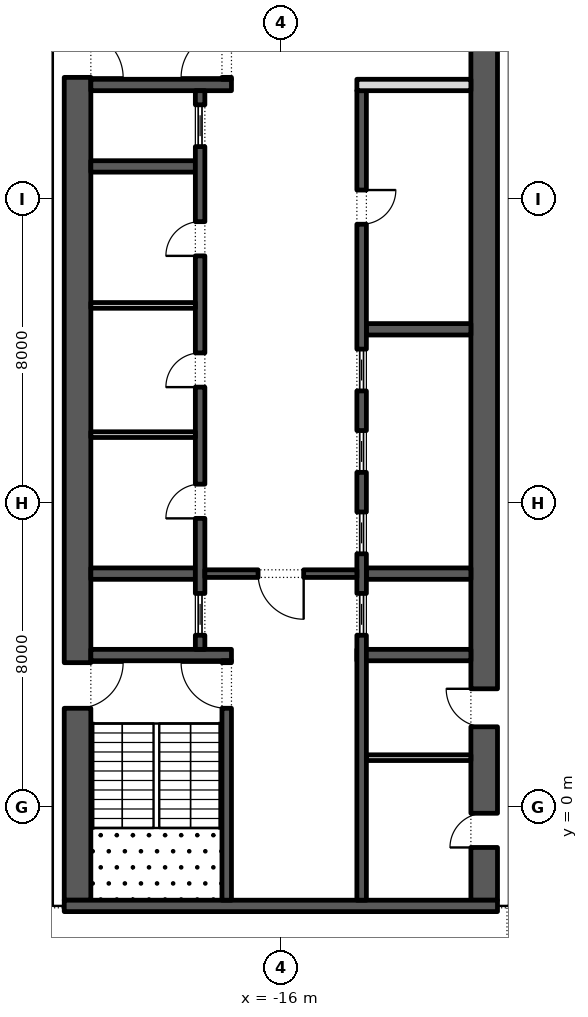
"""IFC4 building model, lengths in metres.
Left out: names, types, materials, properties, quantities, classifications, styles, units other than length and angle.
Written with IfcOpenShell. Run it as: python <this file> out.ifc"""

import sys

from ifc_helpers import new_model, si_unit, direction, frame, frame_2d, origin, place, context, subcontext, project, spatial, rectangle, extrude, element, fill, save


model = new_model("IFC4")
c1 = context("Model", 3, precision=1e-05, world=origin(), true_north=direction((0.0, 1.0)))
c2 = subcontext(c1, "Body", "Model", "MODEL_VIEW")
j1 = project(units=[si_unit("LENGTHUNIT", "METRE"), si_unit("PLANEANGLEUNIT", "RADIAN")], contexts=[c1])
p1 = place(None, origin())
s1 = spatial("IfcSite", under=j1, at=p1, CompositionType="ELEMENT")
p2 = place(p1, origin())
s2 = spatial("IfcBuilding", under=s1, at=p2, CompositionType="ELEMENT")
p3 = place(p2, frame((0.0, 0.0, 222.0)))
s3 = spatial("IfcBuildingStorey", under=s2, at=p3, CompositionType="ELEMENT", Elevation=222.0)
p4 = place(p3, frame((-33.157, 30.092, 0.0), z_axis=(0.0, 0.0, 1.0), x_axis=(0.224950279389, -0.974370243697, 0.0)))
e1 = element("IfcWall", 1, at=p4, inside=s3, PredefinedType="STANDARD", context=c2, shape_type="SweptSolid", body=[
    extrude(rectangle(XDim=49.5, YDim=0.3, at=frame_2d((24.75, 0.0))), origin(), (0.0, 0.0, 1.0), 3.75),
])
p5 = place(p4, frame((2.207, 0.0, 0.0)))
e2 = element("IfcOpeningElement", 2, at=p5, cuts=e1, PredefinedType="OPENING", context=c2, shape_type="SweptSolid", body=[
    extrude(rectangle(XDim=2.4, YDim=3.5, at=frame_2d((1.2, 1.75))), frame((0.0, 0.16, 0.0), z_axis=(0.0, -1.0, 0.0), x_axis=(1.0, 0.0, 0.0)), (0.0, 0.0, 1.0), 0.32),
])
p6 = place(p4, frame((7.871, 0.0, 0.45)))
e3 = element("IfcOpeningElement", 3, at=p6, cuts=e1, PredefinedType="OPENING", context=c2, shape_type="SweptSolid", body=[
    extrude(rectangle(XDim=5.0, YDim=2.575, at=frame_2d((2.5, 1.288))), frame((0.0, 0.16, 0.0), z_axis=(0.0, -1.0, 0.0), x_axis=(1.0, 0.0, 0.0)), (0.0, 0.0, 1.0), 0.32),
])
p7 = place(p4, frame((14.986, 0.0, 0.45)))
e4 = element("IfcOpeningElement", 4, at=p7, cuts=e1, PredefinedType="OPENING", context=c2, shape_type="SweptSolid", body=[
    extrude(rectangle(XDim=5.0, YDim=3.25, at=frame_2d((2.5, 1.625))), frame((0.0, 0.16, 0.0), z_axis=(0.0, -1.0, 0.0), x_axis=(1.0, 0.0, 0.0)), (0.0, 0.0, 1.0), 0.32),
])
p8 = place(p4, frame((22.1, 0.0, 0.45)))
e5 = element("IfcOpeningElement", 5, at=p8, cuts=e1, PredefinedType="OPENING", context=c2, shape_type="SweptSolid", body=[
    extrude(rectangle(XDim=5.0, YDim=2.75, at=frame_2d((2.5, 1.375))), frame((0.0, 0.16, 0.0), z_axis=(0.0, -1.0, 0.0), x_axis=(1.0, 0.0, 0.0)), (0.0, 0.0, 1.0), 0.32),
])
p9 = place(p4, frame((30.514, 0.0, 0.0)))
e6 = element("IfcOpeningElement", 6, at=p9, cuts=e1, PredefinedType="OPENING", context=c2, shape_type="SweptSolid", body=[
    extrude(rectangle(XDim=2.4, YDim=3.5, at=frame_2d((1.2, 1.75))), frame((0.0, 0.16, 0.0), z_axis=(0.0, -1.0, 0.0), x_axis=(1.0, 0.0, 0.0)), (0.0, 0.0, 1.0), 0.32),
])
p10 = place(p4, frame((36.329, 0.0, 0.45)))
e7 = element("IfcOpeningElement", 7, at=p10, cuts=e1, PredefinedType="OPENING", context=c2, shape_type="SweptSolid", body=[
    extrude(rectangle(XDim=5.0, YDim=3.25, at=frame_2d((2.5, 1.625))), frame((0.0, 0.16, 0.0), z_axis=(0.0, -1.0, 0.0), x_axis=(1.0, 0.0, 0.0)), (0.0, 0.0, 1.0), 0.32),
])
p11 = place(p4, frame((43.443, 0.0, 0.45)))
e8 = element("IfcOpeningElement", 8, at=p11, cuts=e1, PredefinedType="OPENING", context=c2, shape_type="SweptSolid", body=[
    extrude(rectangle(XDim=5.0, YDim=3.25, at=frame_2d((2.5, 1.625))), frame((0.0, 0.16, 0.0), z_axis=(0.0, -1.0, 0.0), x_axis=(1.0, 0.0, 0.0)), (0.0, 0.0, 1.0), 0.32),
])
p12 = place(p3, frame((-21.35, -2.45, 0.0), z_axis=(0.0, 0.0, 1.0), x_axis=(0.0, 1.0, 0.0)))
e9 = element("IfcWall", 9, at=p12, inside=s3, PredefinedType="SHEAR", context=c2, shape_type="SweptSolid", body=[
    extrude(rectangle(XDim=27.9, YDim=0.7, at=frame_2d((13.95, 0.0))), origin(), (0.0, 0.0, 1.0), 3.75),
])
p13 = place(p12, frame((5.05, 0.0, 0.0)))
e10 = element("IfcOpeningElement", 10, at=p13, cuts=e9, PredefinedType="OPENING", context=c2, shape_type="SweptSolid", body=[
    extrude(rectangle(XDim=1.2, YDim=2.1, at=frame_2d((0.6, 1.05))), frame((0.0, 0.36, 0.0), z_axis=(0.0, -1.0, 0.0), x_axis=(1.0, 0.0, 0.0)), (0.0, 0.0, 1.0), 0.72),
])
p14 = place(p12, frame((21.65, 0.0, 0.0)))
e11 = element("IfcOpeningElement", 11, at=p14, cuts=e9, PredefinedType="OPENING", context=c2, shape_type="SweptSolid", body=[
    extrude(rectangle(XDim=1.2, YDim=2.1, at=frame_2d((0.6, 1.05))), frame((0.0, 0.36, 0.0), z_axis=(0.0, -1.0, 0.0), x_axis=(1.0, 0.0, 0.0)), (0.0, 0.0, 1.0), 0.72),
])
p15 = place(p3, frame((-10.65, -2.45, 0.0), z_axis=(0.0, 0.0, 1.0), x_axis=(0.0, 1.0, 0.0)))
e12 = element("IfcWall", 12, at=p15, inside=s3, PredefinedType="SHEAR", context=c2, shape_type="SweptSolid", body=[
    extrude(rectangle(XDim=27.9, YDim=0.7, at=frame_2d((13.95, 0.0))), origin(), (0.0, 0.0, 1.0), 3.75),
])
p16 = place(p15, frame((23.65, 0.0, 0.0)))
e13 = element("IfcOpeningElement", 13, at=p16, cuts=e12, PredefinedType="OPENING", context=c2, shape_type="SweptSolid", body=[
    extrude(rectangle(XDim=2.4, YDim=2.1, at=frame_2d((1.2, 1.05))), frame((0.0, 0.36, 0.0), z_axis=(0.0, -1.0, 0.0), x_axis=(1.0, 0.0, 0.0)), (0.0, 0.0, 1.0), 0.72),
])
p17 = place(p15, frame((1.387, 0.0, 0.0)))
e14 = element("IfcOpeningElement", 14, at=p17, cuts=e12, PredefinedType="OPENING", context=c2, shape_type="SweptSolid", body=[
    extrude(rectangle(XDim=0.9, YDim=2.1, at=frame_2d((0.45, 1.05))), frame((0.0, 0.36, 0.0), z_axis=(0.0, -1.0, 0.0), x_axis=(1.0, 0.0, 0.0)), (0.0, 0.0, 1.0), 0.72),
])
p18 = place(p15, frame((4.562, 0.0, 0.0)))
e15 = element("IfcOpeningElement", 15, at=p18, cuts=e12, PredefinedType="OPENING", context=c2, shape_type="SweptSolid", body=[
    extrude(rectangle(XDim=1.0, YDim=2.1, at=frame_2d((0.5, 1.05))), frame((0.0, 0.36, 0.0), z_axis=(0.0, -1.0, 0.0), x_axis=(1.0, 0.0, 0.0)), (0.0, 0.0, 1.0), 0.72),
])
p19 = place(p3, frame((-21.7, -2.6, 0.0), z_axis=(0.0, 0.0, 1.0), x_axis=(1.0, 0.0, 0.0)))
e16 = element("IfcWall", 16, at=p19, inside=s3, PredefinedType="SHEAR", context=c2, shape_type="SweptSolid", body=[
    extrude(rectangle(XDim=11.4, YDim=0.3, at=frame_2d((5.7, 0.0))), origin(), (0.0, 0.0, 1.0), 3.75),
])
p20 = place(p3, frame((-21.0, 4.0, 0.0), z_axis=(0.0, 0.0, 1.0), x_axis=(1.0, 0.0, 0.0)))
e17 = element("IfcWall", 17, at=p20, inside=s3, PredefinedType="SHEAR", context=c2, shape_type="SweptSolid", body=[
    extrude(rectangle(XDim=3.7, YDim=0.3, at=frame_2d((1.85, 0.0))), origin(), (0.0, 0.0, 1.0), 3.75),
])
p21 = place(p3, frame((-17.425, -2.45, 0.0), z_axis=(0.0, 0.0, 1.0), x_axis=(0.0, 1.0, 0.0)))
e18 = element("IfcWall", 18, at=p21, inside=s3, PredefinedType="SHEAR", context=c2, shape_type="SweptSolid", body=[
    extrude(rectangle(XDim=6.3, YDim=0.25, at=frame_2d((3.15, 0.0))), origin(), (0.0, 0.0, 1.0), 3.75),
])
p22 = place(p21, frame((5.05, 0.0, 0.0)))
e19 = element("IfcOpeningElement", 19, at=p22, cuts=e18, PredefinedType="OPENING", context=c2, shape_type="SweptSolid", body=[
    extrude(rectangle(XDim=1.2, YDim=2.1, at=frame_2d((0.6, 1.05))), frame((0.0, 0.135, 0.0), z_axis=(0.0, -1.0, 0.0), x_axis=(1.0, 0.0, 0.0)), (0.0, 0.0, 1.0), 0.27),
])
p23 = place(p3, frame((-21.0, 19.0, 0.0), z_axis=(0.0, 0.0, 1.0), x_axis=(1.0, 0.0, 0.0)))
e20 = element("IfcWall", 20, at=p23, inside=s3, PredefinedType="SHEAR", context=c2, shape_type="SweptSolid", body=[
    extrude(rectangle(XDim=3.7, YDim=0.3, at=frame_2d((1.85, 0.0))), origin(), (0.0, 0.0, 1.0), 3.75),
])
p24 = place(p3, frame((-17.425, 19.15, 0.0), z_axis=(0.0, 0.0, 1.0), x_axis=(0.0, 1.0, 0.0)))
e21 = element("IfcWall", 21, at=p24, inside=s3, PredefinedType="SHEAR", context=c2, shape_type="SweptSolid", body=[
    extrude(rectangle(XDim=6.3, YDim=0.25, at=frame_2d((3.15, 0.0))), origin(), (0.0, 0.0, 1.0), 3.75),
])
p25 = place(p24, frame((0.05, 0.0, 0.0)))
e22 = element("IfcOpeningElement", 22, at=p25, cuts=e21, PredefinedType="OPENING", context=c2, shape_type="SweptSolid", body=[
    extrude(rectangle(XDim=1.2, YDim=2.1, at=frame_2d((0.6, 1.05))), frame((0.0, 0.135, 0.0), z_axis=(0.0, -1.0, 0.0), x_axis=(1.0, 0.0, 0.0)), (0.0, 0.0, 1.0), 0.27),
])
for number, where, z_axis, x_axis in (
    (23, (-21.0, 6.143, 0.0), (0.0, 0.0, 1.0), (1.0, 0.0, 0.0)),
    (24, (-21.0, 16.857, 0.0), (0.0, 0.0, 1.0), (1.0, 0.0, 0.0)),
):
    element("IfcWall", number, at=place(p3, frame(where, z_axis=z_axis, x_axis=x_axis)), inside=s3, PredefinedType="SHEAR", context=c2, shape_type="SweptSolid", body=[
        extrude(rectangle(XDim=2.75, YDim=0.3, at=frame_2d((1.375, 0.0))), origin(), (0.0, 0.0, 1.0), 3.75),
    ])
p26 = place(p3, frame((-18.125, 4.15, 0.0), z_axis=(0.0, 0.0, 1.0), x_axis=(0.0, 1.0, 0.0)))
e25 = element("IfcWall", 25, at=p26, inside=s3, PredefinedType="SHEAR", context=c2, shape_type="SweptSolid", body=[
    extrude(rectangle(XDim=14.7, YDim=0.25, at=frame_2d((7.35, 0.0))), origin(), (0.0, 0.0, 1.0), 3.75),
])
p27 = place(p26, frame((3.446, 0.0, 0.0)))
e26 = element("IfcOpeningElement", 26, at=p27, cuts=e25, PredefinedType="OPENING", context=c2, shape_type="SweptSolid", body=[
    extrude(rectangle(XDim=0.9, YDim=2.1, at=frame_2d((0.45, 1.05))), frame((0.0, 0.135, 0.0), z_axis=(0.0, -1.0, 0.0), x_axis=(1.0, 0.0, 0.0)), (0.0, 0.0, 1.0), 0.27),
])
p28 = place(p26, frame((6.9, 0.0, 0.0)))
e27 = element("IfcOpeningElement", 27, at=p28, cuts=e25, PredefinedType="OPENING", context=c2, shape_type="SweptSolid", body=[
    extrude(rectangle(XDim=0.9, YDim=2.1, at=frame_2d((0.45, 1.05))), frame((0.0, 0.135, 0.0), z_axis=(0.0, -1.0, 0.0), x_axis=(1.0, 0.0, 0.0)), (0.0, 0.0, 1.0), 0.27),
])
p29 = place(p26, frame((10.354, 0.0, 0.0)))
e28 = element("IfcOpeningElement", 28, at=p29, cuts=e25, PredefinedType="OPENING", context=c2, shape_type="SweptSolid", body=[
    extrude(rectangle(XDim=0.9, YDim=2.1, at=frame_2d((0.45, 1.05))), frame((0.0, 0.135, 0.0), z_axis=(0.0, -1.0, 0.0), x_axis=(1.0, 0.0, 0.0)), (0.0, 0.0, 1.0), 0.27),
])
p30 = place(p26, frame((0.371, 0.0, 0.0)))
e29 = element("IfcOpeningElement", 29, at=p30, cuts=e25, PredefinedType="OPENING", context=c2, shape_type="SweptSolid", body=[
    extrude(rectangle(XDim=1.1, YDim=2.1, at=frame_2d((0.55, 1.05))), frame((0.0, 0.135, 0.0), z_axis=(0.0, -1.0, 0.0), x_axis=(1.0, 0.0, 0.0)), (0.0, 0.0, 1.0), 0.27),
])
p31 = place(p26, frame((13.229, 0.0, 0.0)))
e30 = element("IfcOpeningElement", 30, at=p31, cuts=e25, PredefinedType="OPENING", context=c2, shape_type="SweptSolid", body=[
    extrude(rectangle(XDim=1.1, YDim=2.1, at=frame_2d((0.55, 1.05))), frame((0.0, 0.135, 0.0), z_axis=(0.0, -1.0, 0.0), x_axis=(1.0, 0.0, 0.0)), (0.0, 0.0, 1.0), 0.27),
])
for number, where, z_axis, x_axis in (
    (31, (-21.0, 9.8, 0.0), (0.0, 0.0, 1.0), (1.0, 0.0, 0.0)),
    (32, (-21.0, 13.2, 0.0), (0.0, 0.0, 1.0), (1.0, 0.0, 0.0)),
):
    element("IfcWall", number, at=place(p3, frame(where, z_axis=z_axis, x_axis=x_axis)), inside=s3, PredefinedType="PARTITIONING", context=c2, shape_type="SweptSolid", body=[
        extrude(rectangle(XDim=2.75, YDim=0.15, at=frame_2d((1.375, 0.0))), origin(), (0.0, 0.0, 1.0), 3.75),
    ])
p32 = place(p3, frame((-14.0, 4.0, 0.0), z_axis=(0.0, 0.0, 1.0), x_axis=(1.0, 0.0, 0.0)))
e33 = element("IfcWall", 33, at=p32, inside=s3, PredefinedType="SHEAR", context=c2, shape_type="SweptSolid", body=[
    extrude(rectangle(XDim=3.0, YDim=0.3, at=frame_2d((1.5, 0.0))), origin(), (0.0, 0.0, 1.0), 3.75),
])
for number, where, z_axis, x_axis in (
    (34, (-13.75, 6.143, 0.0), (0.0, 0.0, 1.0), (1.0, 0.0, 0.0)),
    (35, (-13.75, 12.571, 0.0), (0.0, 0.0, 1.0), (1.0, 0.0, 0.0)),
):
    element("IfcWall", number, at=place(p3, frame(where, z_axis=z_axis, x_axis=x_axis)), inside=s3, PredefinedType="SHEAR", context=c2, shape_type="SweptSolid", body=[
        extrude(rectangle(XDim=2.75, YDim=0.3, at=frame_2d((1.375, 0.0))), origin(), (0.0, 0.0, 1.0), 3.75),
    ])
p33 = place(p3, frame((-13.875, -2.45, 0.0), z_axis=(0.0, 0.0, 1.0), x_axis=(0.0, 1.0, 0.0)))
e36 = element("IfcWall", 36, at=p33, inside=s3, PredefinedType="SHEAR", context=c2, shape_type="SweptSolid", body=[
    extrude(rectangle(XDim=21.3, YDim=0.25, at=frame_2d((10.65, 0.0))), origin(), (0.0, 0.0, 1.0), 3.75),
])
p34 = place(p33, frame((17.786, 0.0, 0.0)))
e37 = element("IfcOpeningElement", 37, at=p34, cuts=e36, PredefinedType="OPENING", context=c2, shape_type="SweptSolid", body=[
    extrude(rectangle(XDim=0.9, YDim=2.1, at=frame_2d((0.45, 1.05))), frame((0.0, 0.135, 0.0), z_axis=(0.0, -1.0, 0.0), x_axis=(1.0, 0.0, 0.0)), (0.0, 0.0, 1.0), 0.27),
])
p35 = place(p33, frame((6.971, 0.0, 0.0)))
e38 = element("IfcOpeningElement", 38, at=p35, cuts=e36, PredefinedType="OPENING", context=c2, shape_type="SweptSolid", body=[
    extrude(rectangle(XDim=1.1, YDim=2.1, at=frame_2d((0.55, 1.05))), frame((0.0, 0.135, 0.0), z_axis=(0.0, -1.0, 0.0), x_axis=(1.0, 0.0, 0.0)), (0.0, 0.0, 1.0), 0.27),
])
p36 = place(p33, frame((9.114, 0.0, 0.0)))
e39 = element("IfcOpeningElement", 39, at=p36, cuts=e36, PredefinedType="OPENING", context=c2, shape_type="SweptSolid", body=[
    extrude(rectangle(XDim=1.1, YDim=2.1, at=frame_2d((0.55, 1.05))), frame((0.0, 0.135, 0.0), z_axis=(0.0, -1.0, 0.0), x_axis=(1.0, 0.0, 0.0)), (0.0, 0.0, 1.0), 0.27),
])
p37 = place(p33, frame((11.257, 0.0, 0.0)))
e40 = element("IfcOpeningElement", 40, at=p37, cuts=e36, PredefinedType="OPENING", context=c2, shape_type="SweptSolid", body=[
    extrude(rectangle(XDim=1.1, YDim=2.1, at=frame_2d((0.55, 1.05))), frame((0.0, 0.135, 0.0), z_axis=(0.0, -1.0, 0.0), x_axis=(1.0, 0.0, 0.0)), (0.0, 0.0, 1.0), 0.27),
])
p38 = place(p33, frame((13.4, 0.0, 0.0)))
e41 = element("IfcOpeningElement", 41, at=p38, cuts=e36, PredefinedType="OPENING", context=c2, shape_type="SweptSolid", body=[
    extrude(rectangle(XDim=1.1, YDim=2.1, at=frame_2d((0.55, 1.05))), frame((0.0, 0.135, 0.0), z_axis=(0.0, -1.0, 0.0), x_axis=(1.0, 0.0, 0.0)), (0.0, 0.0, 1.0), 0.27),
])
p39 = place(p3, frame((-14.0, 19.0, 0.0), z_axis=(0.0, 0.0, 1.0), x_axis=(1.0, 0.0, 0.0)))
e42 = element("IfcWall", 42, at=p39, inside=s3, PredefinedType="PARTITIONING", context=c2, shape_type="SweptSolid", body=[
    extrude(rectangle(XDim=3.0, YDim=0.3, at=frame_2d((1.5, 0.0))), origin(), (0.0, 0.0, 1.0), 3.75),
])
p40 = place(p3, frame((-18.0, 6.143, 0.0), z_axis=(0.0, 0.0, 1.0), x_axis=(1.0, 0.0, 0.0)))
e43 = element("IfcWall", 43, at=p40, inside=s3, PredefinedType="SHEAR", context=c2, shape_type="SweptSolid", body=[
    extrude(rectangle(XDim=4.0, YDim=0.2, at=frame_2d((2.0, 0.0))), origin(), (0.0, 0.0, 1.0), 3.75),
])
p41 = place(p40, frame((1.4, 0.0, 0.0)))
e44 = element("IfcOpeningElement", 44, at=p41, cuts=e43, PredefinedType="OPENING", context=c2, shape_type="SweptSolid", body=[
    extrude(rectangle(XDim=1.2, YDim=2.1, at=frame_2d((0.6, 1.05))), frame((0.0, 0.11, 0.0), z_axis=(0.0, -1.0, 0.0), x_axis=(1.0, 0.0, 0.0)), (0.0, 0.0, 1.0), 0.22),
])
p42 = place(p3, frame((-13.75, 1.3, 0.0), z_axis=(0.0, 0.0, 1.0), x_axis=(1.0, 0.0, 0.0)))
e45 = element("IfcWall", 45, at=p42, inside=s3, PredefinedType="PARTITIONING", context=c2, shape_type="SweptSolid", body=[
    extrude(rectangle(XDim=2.75, YDim=0.15, at=frame_2d((1.375, 0.0))), origin(), (0.0, 0.0, 1.0), 3.75),
])
p43 = place(p27, origin())
e46 = element("IfcDoor", 46, at=p43, inside=s3, OperationType="SINGLE_SWING_RIGHT", PredefinedType="DOOR", context=c2, shape_type="SweptSolid", body=[
    extrude(rectangle(XDim=0.9, YDim=2.1, at=frame_2d((0.45, 1.05))), frame((0.0, 0.125, 0.0), z_axis=(0.0, -1.0, 0.0), x_axis=(1.0, 0.0, 0.0)), (0.0, 0.0, 1.0), 0.05),
])
fill(e26, e46)
p44 = place(p28, origin())
e47 = element("IfcDoor", 47, at=p44, inside=s3, OperationType="SINGLE_SWING_RIGHT", PredefinedType="DOOR", context=c2, shape_type="SweptSolid", body=[
    extrude(rectangle(XDim=0.9, YDim=2.1, at=frame_2d((0.45, 1.05))), frame((0.0, 0.125, 0.0), z_axis=(0.0, -1.0, 0.0), x_axis=(1.0, 0.0, 0.0)), (0.0, 0.0, 1.0), 0.05),
])
fill(e27, e47)
p45 = place(p29, origin())
e48 = element("IfcDoor", 48, at=p45, inside=s3, OperationType="SINGLE_SWING_RIGHT", PredefinedType="DOOR", context=c2, shape_type="SweptSolid", body=[
    extrude(rectangle(XDim=0.9, YDim=2.1, at=frame_2d((0.45, 1.05))), frame((0.0, 0.125, 0.0), z_axis=(0.0, -1.0, 0.0), x_axis=(1.0, 0.0, 0.0)), (0.0, 0.0, 1.0), 0.05),
])
fill(e28, e48)
p46 = place(p30, origin())
e49 = element("IfcDoor", 49, at=p46, inside=s3, OperationType="SLIDING_TO_LEFT", PredefinedType="DOOR", context=c2, shape_type="SweptSolid", body=[
    extrude(rectangle(XDim=1.1, YDim=2.1, at=frame_2d((0.55, 1.05))), frame((0.0, 0.025, 0.0), z_axis=(0.0, -1.0, 0.0), x_axis=(1.0, 0.0, 0.0)), (0.0, 0.0, 1.0), 0.05),
])
fill(e29, e49)
p47 = place(p31, origin())
e50 = element("IfcDoor", 50, at=p47, inside=s3, OperationType="SLIDING_TO_LEFT", PredefinedType="DOOR", context=c2, shape_type="SweptSolid", body=[
    extrude(rectangle(XDim=1.1, YDim=2.1, at=frame_2d((0.55, 1.05))), frame((0.0, 0.025, 0.0), z_axis=(0.0, -1.0, 0.0), x_axis=(1.0, 0.0, 0.0)), (0.0, 0.0, 1.0), 0.05),
])
fill(e30, e50)
p48 = place(p34, frame((0.9, -0.2, 0.0), z_axis=(0.0, 0.0, 1.0), x_axis=(-1.0, 0.0, 0.0)))
e51 = element("IfcDoor", 51, at=p48, inside=s3, OperationType="SINGLE_SWING_RIGHT", PredefinedType="DOOR", context=c2, shape_type="SweptSolid", body=[
    extrude(rectangle(XDim=0.9, YDim=2.1, at=frame_2d((0.45, 1.05))), frame((0.0, -0.075, 0.0), z_axis=(0.0, -1.0, 0.0), x_axis=(1.0, 0.0, 0.0)), (0.0, 0.0, 1.0), 0.05),
])
fill(e37, e51)
p49 = place(p35, origin())
e52 = element("IfcDoor", 52, at=p49, inside=s3, OperationType="SLIDING_TO_LEFT", PredefinedType="DOOR", context=c2, shape_type="SweptSolid", body=[
    extrude(rectangle(XDim=1.1, YDim=2.1, at=frame_2d((0.55, 1.05))), frame((0.0, 0.025, 0.0), z_axis=(0.0, -1.0, 0.0), x_axis=(1.0, 0.0, 0.0)), (0.0, 0.0, 1.0), 0.05),
])
fill(e38, e52)
p50 = place(p36, origin())
e53 = element("IfcDoor", 53, at=p50, inside=s3, OperationType="SLIDING_TO_LEFT", PredefinedType="DOOR", context=c2, shape_type="SweptSolid", body=[
    extrude(rectangle(XDim=1.1, YDim=2.1, at=frame_2d((0.55, 1.05))), frame((0.0, 0.025, 0.0), z_axis=(0.0, -1.0, 0.0), x_axis=(1.0, 0.0, 0.0)), (0.0, 0.0, 1.0), 0.05),
])
fill(e39, e53)
p51 = place(p37, origin())
e54 = element("IfcDoor", 54, at=p51, inside=s3, OperationType="SLIDING_TO_LEFT", PredefinedType="DOOR", context=c2, shape_type="SweptSolid", body=[
    extrude(rectangle(XDim=1.1, YDim=2.1, at=frame_2d((0.55, 1.05))), frame((0.0, 0.025, 0.0), z_axis=(0.0, -1.0, 0.0), x_axis=(1.0, 0.0, 0.0)), (0.0, 0.0, 1.0), 0.05),
])
fill(e40, e54)
p52 = place(p38, origin())
e55 = element("IfcDoor", 55, at=p52, inside=s3, OperationType="SLIDING_TO_LEFT", PredefinedType="DOOR", context=c2, shape_type="SweptSolid", body=[
    extrude(rectangle(XDim=1.1, YDim=2.1, at=frame_2d((0.55, 1.05))), frame((0.0, 0.025, 0.0), z_axis=(0.0, -1.0, 0.0), x_axis=(1.0, 0.0, 0.0)), (0.0, 0.0, 1.0), 0.05),
])
fill(e41, e55)
p53 = place(p41, frame((1.2, 0.0, 0.0), z_axis=(0.0, 0.0, 1.0), x_axis=(-1.0, 0.0, 0.0)))
e56 = element("IfcDoor", 56, at=p53, inside=s3, OperationType="SINGLE_SWING_RIGHT", PredefinedType="DOOR", context=c2, shape_type="SweptSolid", body=[
    extrude(rectangle(XDim=1.2, YDim=2.1, at=frame_2d((0.6, 1.05))), frame((0.0, 0.025, 0.0), z_axis=(0.0, -1.0, 0.0), x_axis=(1.0, 0.0, 0.0)), (0.0, 0.0, 1.0), 0.05),
])
fill(e44, e56)
p54 = place(p22, origin())
e57 = element("IfcDoor", 57, at=p54, inside=s3, OperationType="SINGLE_SWING_LEFT", PredefinedType="DOOR", context=c2, shape_type="SweptSolid", body=[
    extrude(rectangle(XDim=1.2, YDim=2.1, at=frame_2d((0.6, 1.05))), frame((0.0, 0.025, 0.0), z_axis=(0.0, -1.0, 0.0), x_axis=(1.0, 0.0, 0.0)), (0.0, 0.0, 1.0), 0.05),
])
fill(e19, e57)
p55 = place(p13, frame((1.2, 0.0, 0.0), z_axis=(0.0, 0.0, 1.0), x_axis=(-1.0, 0.0, 0.0)))
e58 = element("IfcDoor", 58, at=p55, inside=s3, OperationType="SINGLE_SWING_RIGHT", PredefinedType="DOOR", context=c2, shape_type="SweptSolid", body=[
    extrude(rectangle(XDim=1.2, YDim=2.1, at=frame_2d((0.6, 1.05))), frame((0.0, 0.025, 0.0), z_axis=(0.0, -1.0, 0.0), x_axis=(1.0, 0.0, 0.0)), (0.0, 0.0, 1.0), 0.05),
])
fill(e10, e58)
p56 = place(p25, origin())
e59 = element("IfcDoor", 59, at=p56, inside=s3, OperationType="SINGLE_SWING_RIGHT", PredefinedType="DOOR", context=c2, shape_type="SweptSolid", body=[
    extrude(rectangle(XDim=1.2, YDim=2.1, at=frame_2d((0.6, 1.05))), frame((0.0, 0.025, 0.0), z_axis=(0.0, -1.0, 0.0), x_axis=(1.0, 0.0, 0.0)), (0.0, 0.0, 1.0), 0.05),
])
fill(e22, e59)
p57 = place(p14, frame((1.2, 0.0, 0.0), z_axis=(0.0, 0.0, 1.0), x_axis=(-1.0, 0.0, 0.0)))
e60 = element("IfcDoor", 60, at=p57, inside=s3, OperationType="SINGLE_SWING_LEFT", PredefinedType="DOOR", context=c2, shape_type="SweptSolid", body=[
    extrude(rectangle(XDim=1.2, YDim=2.1, at=frame_2d((0.6, 1.05))), frame((0.0, 0.025, 0.0), z_axis=(0.0, -1.0, 0.0), x_axis=(1.0, 0.0, 0.0)), (0.0, 0.0, 1.0), 0.05),
])
fill(e11, e60)
p58 = place(p17, origin())
e61 = element("IfcDoor", 61, at=p58, inside=s3, OperationType="SINGLE_SWING_RIGHT", PredefinedType="DOOR", context=c2, shape_type="SweptSolid", body=[
    extrude(rectangle(XDim=0.9, YDim=2.1, at=frame_2d((0.45, 1.05))), frame((0.0, 0.35, 0.0), z_axis=(0.0, -1.0, 0.0), x_axis=(1.0, 0.0, 0.0)), (0.0, 0.0, 1.0), 0.05),
])
fill(e14, e61)
p59 = place(p18, origin())
e62 = element("IfcDoor", 62, at=p59, inside=s3, OperationType="SINGLE_SWING_LEFT", PredefinedType="DOOR", context=c2, shape_type="SweptSolid", body=[
    extrude(rectangle(XDim=1.0, YDim=2.1, at=frame_2d((0.5, 1.05))), frame((0.0, 0.35, 0.0), z_axis=(0.0, -1.0, 0.0), x_axis=(1.0, 0.0, 0.0)), (0.0, 0.0, 1.0), 0.05),
])
fill(e15, e62)
save(model, sys.argv[1])
